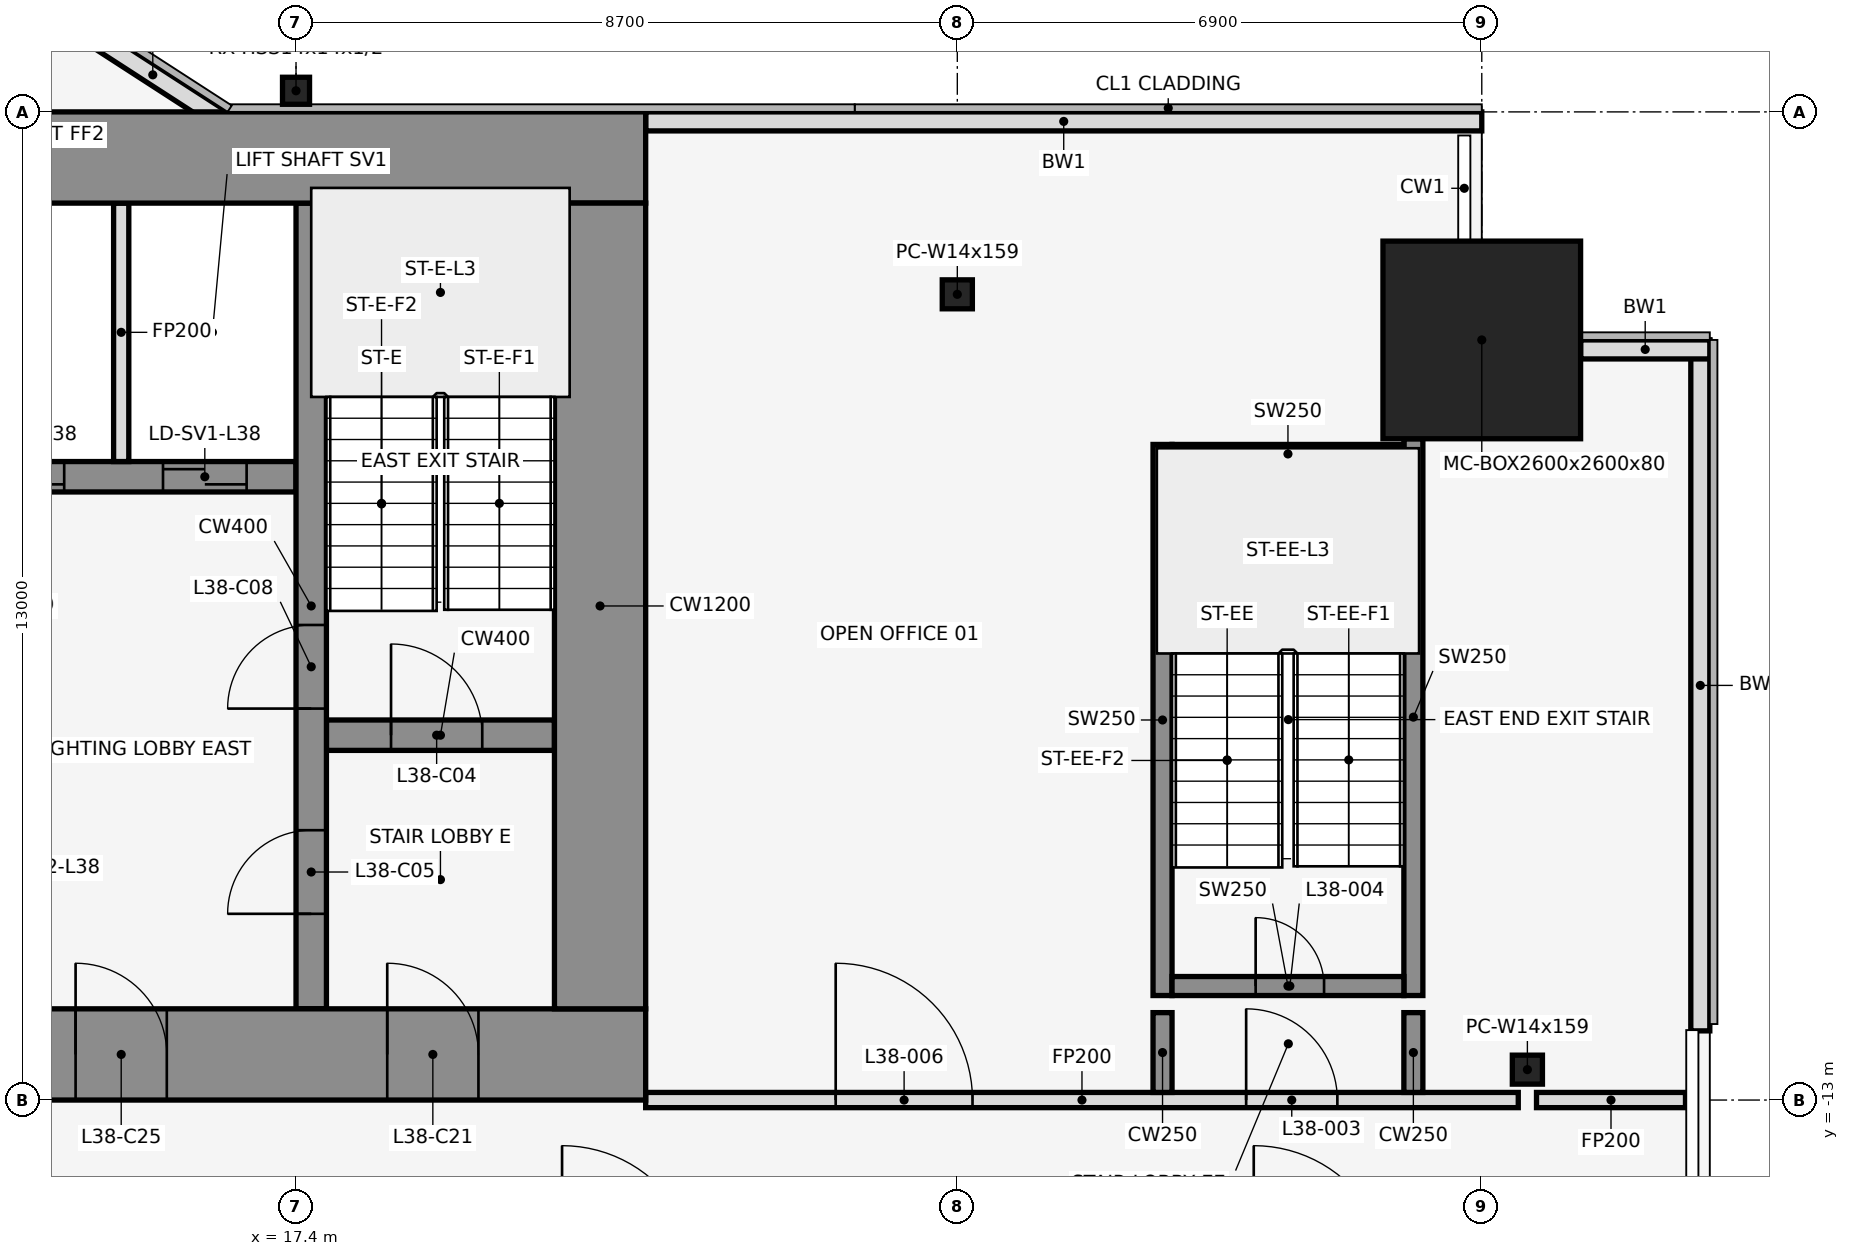
"""IFC4 building model, lengths in metres.
Left out: names, types, materials, properties, quantities, classifications, styles, units other than length and angle.
Written with IfcOpenShell. Run it as: python <this file> out.ifc"""

import sys

from ifc_helpers import new_model, si_unit, direction, frame, frame_2d, origin, origin_2d, place, context, subcontext, project, spatial, rectangle, hollow_rectangle, i_section, extrude, element, fill, save


model = new_model("IFC4")
c1 = context("Model", 3, precision=1e-05, world=origin(), true_north=direction((0.0, 1.0)))
c2 = subcontext(c1, "Body", "Model", "MODEL_VIEW")
j1 = project(units=[si_unit("LENGTHUNIT", "METRE"), si_unit("PLANEANGLEUNIT", "RADIAN")], contexts=[c1])
p1 = place(None, origin())
s1 = spatial("IfcSite", under=j1, at=p1, CompositionType="ELEMENT")
p2 = place(p1, origin())
s2 = spatial("IfcBuilding", under=s1, at=p2, CompositionType="ELEMENT")
p3 = place(p2, frame((0.0, 0.0, 173.2)))
s3 = spatial("IfcBuildingStorey", under=s2, at=p3, CompositionType="ELEMENT", Elevation=173.2)
p4 = place(p3, frame((26.1, -2.4, 0.0), z_axis=(0.0, 0.0, 1.0), x_axis=(1.0, 0.0, 0.0)))
e1 = element("IfcColumn", 1, at=p4, inside=s3, PredefinedType="COLUMN", context=c2, shape_type="SweptSolid", body=[
    extrude(i_section(OverallWidth=0.396, OverallDepth=0.381, WebThickness=0.019, FlangeThickness=0.03, at=origin_2d()), origin(), (0.0, 0.0, 1.0), 4.1),
])
p5 = place(p3, frame((33.0, -3.0, 0.0), z_axis=(0.0, 0.0, 1.0), x_axis=(1.0, 0.0, 0.0)))
e2 = element("IfcColumn", 2, at=p5, inside=s3, PredefinedType="COLUMN", context=c2, shape_type="SweptSolid", body=[
    extrude(hollow_rectangle(XDim=2.6, YDim=2.6, WallThickness=0.08, at=origin_2d()), origin(), (0.0, 0.0, 1.0), 4.1),
])
p6 = place(p3, frame((17.4, 0.278, 0.0), z_axis=(0.0, 0.0, 1.0), x_axis=(1.0, 0.0, 0.0)))
e3 = element("IfcColumn", 3, at=p6, inside=s3, PredefinedType="COLUMN", context=c2, shape_type="SweptSolid", body=[
    extrude(hollow_rectangle(XDim=0.356, YDim=0.356, WallThickness=0.012, at=origin_2d()), origin(), (0.0, 0.0, 1.0), 4.1),
])
p7 = place(p3, frame((33.6, -12.6, 0.0), z_axis=(0.0, 0.0, 1.0), x_axis=(1.0, 0.0, 0.0)))
e4 = element("IfcColumn", 4, at=p7, inside=s3, PredefinedType="COLUMN", context=c2, shape_type="SweptSolid", body=[
    extrude(i_section(OverallWidth=0.396, OverallDepth=0.381, WebThickness=0.019, FlangeThickness=0.03, at=origin_2d()), origin(), (0.0, 0.0, 1.0), 4.1),
])
p8 = place(p3, frame((33.0, -0.125, 0.0), z_axis=(0.0, 0.0, 1.0), x_axis=(-1.0, 0.0, 0.0)))
e5 = element("IfcWall", 5, at=p8, inside=s3, PredefinedType="STANDARD", context=c2, shape_type="SweptSolid", body=[
    extrude(rectangle(XDim=11.0, YDim=0.25, at=frame_2d((5.5, 0.0))), origin(), (0.0, 0.0, 1.0), 3.95),
])
p9 = place(p3, frame((16.432, -0.105, 0.0), z_axis=(0.0, 0.0, 1.0), x_axis=(-0.83981312244, 0.542875602121, 0.0)))
e6 = element("IfcWall", 6, at=p9, inside=s3, PredefinedType="STANDARD", context=c2, shape_type="SweptSolid", body=[
    extrude(rectangle(XDim=2.183, YDim=0.25, at=frame_2d((1.091, 0.0))), origin(), (0.0, 0.0, 1.0), 3.95),
])
p10 = place(p3, frame((35.875, -12.09, 0.0), z_axis=(0.0, 0.0, 1.0), x_axis=(0.0, 1.0, 0.0)))
e7 = element("IfcWall", 7, at=p10, inside=s3, PredefinedType="STANDARD", context=c2, shape_type="SweptSolid", body=[
    extrude(rectangle(XDim=9.09, YDim=0.25, at=frame_2d((4.545, 0.0))), origin(), (0.0, 0.0, 1.0), 3.95),
])
p11 = place(p3, frame((36.0, -3.125, 0.0), z_axis=(0.0, 0.0, 1.0), x_axis=(-1.0, 0.0, 0.0)))
e8 = element("IfcWall", 8, at=p11, inside=s3, PredefinedType="STANDARD", context=c2, shape_type="SweptSolid", body=[
    extrude(rectangle(XDim=1.7, YDim=0.25, at=frame_2d((0.85, 0.0))), origin(), (0.0, 0.0, 1.0), 3.95),
])
p12 = place(p3, frame((28.8, -11.625, 0.0), z_axis=(0.0, 0.0, 1.0), x_axis=(0.0, 1.0, 0.0)))
e9 = element("IfcWall", 9, at=p12, inside=s3, PredefinedType="SHEAR", context=c2, shape_type="SweptSolid", body=[
    extrude(rectangle(XDim=7.25, YDim=0.25, at=frame_2d((3.625, 0.0))), origin(), (0.0, 0.0, 1.0), 4.1),
])
p13 = place(p3, frame((32.1, -11.625, 0.0), z_axis=(0.0, 0.0, 1.0), x_axis=(0.0, 1.0, 0.0)))
e10 = element("IfcWall", 10, at=p13, inside=s3, PredefinedType="SHEAR", context=c2, shape_type="SweptSolid", body=[
    extrude(rectangle(XDim=7.325, YDim=0.25, at=frame_2d((3.663, 0.0))), origin(), (0.0, 0.0, 1.0), 4.1),
])
p14 = place(p3, frame((28.925, -11.5, 0.0), z_axis=(0.0, 0.0, 1.0), x_axis=(1.0, 0.0, 0.0)))
e11 = element("IfcWall", 11, at=p14, inside=s3, PredefinedType="SHEAR", context=c2, shape_type="SweptSolid", body=[
    extrude(rectangle(XDim=3.05, YDim=0.25, at=frame_2d((1.525, 0.0))), origin(), (0.0, 0.0, 1.0), 4.1),
])
p15 = place(p14, frame((1.1, 0.0, 0.0)))
e12 = element("IfcOpeningElement", 12, at=p15, cuts=e11, PredefinedType="OPENING", context=c2, shape_type="SweptSolid", body=[
    extrude(rectangle(XDim=0.9, YDim=2.1, at=frame_2d((0.45, 1.05))), frame((0.0, 0.137, 0.0), z_axis=(0.0, -1.0, 0.0), x_axis=(1.0, 0.0, 0.0)), (0.0, 0.0, 1.0), 0.274),
])
p16 = place(p3, frame((28.925, -4.5, 0.0), z_axis=(0.0, 0.0, 1.0), x_axis=(1.0, 0.0, 0.0)))
e13 = element("IfcWall", 13, at=p16, inside=s3, PredefinedType="SHEAR", context=c2, shape_type="SweptSolid", body=[
    extrude(rectangle(XDim=3.05, YDim=0.25, at=frame_2d((1.525, 0.0))), origin(), (0.0, 0.0, 1.0), 4.1),
])
p17 = place(p3, frame((22.0, -13.0, 0.0), z_axis=(0.0, 0.0, 1.0), x_axis=(1.0, 0.0, 0.0)))
e14 = element("IfcWall", 14, at=p17, inside=s3, PredefinedType="PARTITIONING", context=c2, shape_type="SweptSolid", body=[
    extrude(rectangle(XDim=11.48, YDim=0.2, at=frame_2d((5.74, 0.0))), origin(), (0.0, 0.0, 1.0), 2.84),
])
p18 = place(p17, frame((7.9, 0.0, 0.0)))
e15 = element("IfcOpeningElement", 15, at=p18, cuts=e14, PredefinedType="OPENING", context=c2, shape_type="SweptSolid", body=[
    extrude(rectangle(XDim=1.2, YDim=2.1, at=frame_2d((0.6, 1.05))), frame((0.0, 0.112, 0.0), z_axis=(0.0, -1.0, 0.0), x_axis=(1.0, 0.0, 0.0)), (0.0, 0.0, 1.0), 0.224),
])
p19 = place(p17, frame((2.5, 0.0, 0.0)))
e16 = element("IfcOpeningElement", 16, at=p19, cuts=e14, PredefinedType="OPENING", context=c2, shape_type="SweptSolid", body=[
    extrude(rectangle(XDim=1.8, YDim=2.1, at=frame_2d((0.9, 1.05))), frame((0.0, 0.112, 0.0), z_axis=(0.0, -1.0, 0.0), x_axis=(1.0, 0.0, 0.0)), (0.0, 0.0, 1.0), 0.224),
])
p20 = place(p3, frame((33.72, -13.0, 0.0), z_axis=(0.0, 0.0, 1.0), x_axis=(1.0, 0.0, 0.0)))
e17 = element("IfcWall", 17, at=p20, inside=s3, PredefinedType="PARTITIONING", context=c2, shape_type="SweptSolid", body=[
    extrude(rectangle(XDim=1.96, YDim=0.2, at=frame_2d((0.98, 0.0))), origin(), (0.0, 0.0, 1.0), 2.84),
])
for number, where, z_axis, x_axis in (
    (18, (28.8, -12.9, 0.0), (0.0, 0.0, 1.0), (0.0, 1.0, 0.0)),
    (19, (32.1, -12.9, 0.0), (0.0, 0.0, 1.0), (0.0, 1.0, 0.0)),
):
    element("IfcWall", number, at=place(p3, frame(where, z_axis=z_axis, x_axis=x_axis)), inside=s3, PredefinedType="SHEAR", context=c2, shape_type="SweptSolid", body=[
        extrude(rectangle(XDim=1.05, YDim=0.25, at=frame_2d((0.525, 0.0))), origin(), (0.0, 0.0, 1.0), 4.1),
    ])
p21 = place(p3, frame((17.8, -8.2, 0.0), z_axis=(0.0, 0.0, 1.0), x_axis=(1.0, 0.0, 0.0)))
e20 = element("IfcWall", 20, at=p21, inside=s3, PredefinedType="SHEAR", context=c2, shape_type="SweptSolid", body=[
    extrude(rectangle(XDim=3.0, YDim=0.4, at=frame_2d((1.5, 0.0))), origin(), (0.0, 0.0, 1.0), 4.1),
])
p22 = place(p21, frame((0.85, 0.0, 0.0)))
e21 = element("IfcOpeningElement", 21, at=p22, cuts=e20, PredefinedType="OPENING", context=c2, shape_type="SweptSolid", body=[
    extrude(rectangle(XDim=1.2, YDim=2.1, at=frame_2d((0.6, 1.05))), frame((0.0, 0.212, 0.0), z_axis=(0.0, -1.0, 0.0), x_axis=(1.0, 0.0, 0.0)), (0.0, 0.0, 1.0), 0.424),
])
p23 = place(p3, frame((3.8, -4.8, 0.0), z_axis=(0.0, 0.0, 1.0), x_axis=(1.0, 0.0, 0.0)))
e22 = element("IfcWall", 22, at=p23, inside=s3, PredefinedType="SHEAR", context=c2, shape_type="SweptSolid", body=[
    extrude(rectangle(XDim=13.6, YDim=0.4, at=frame_2d((6.8, 0.0))), origin(), (0.0, 0.0, 1.0), 4.1),
])
p24 = place(p23, frame((9.45, 0.0, 0.0)))
e23 = element("IfcOpeningElement", 23, at=p24, cuts=e22, PredefinedType="OPENING", context=c2, shape_type="SweptSolid", body=[
    extrude(rectangle(XDim=1.1, YDim=2.1, at=frame_2d((0.55, 1.05))), frame((0.0, 0.212, 0.0), z_axis=(0.0, -1.0, 0.0), x_axis=(1.0, 0.0, 0.0)), (0.0, 0.0, 1.0), 0.424),
])
p25 = place(p23, frame((11.85, 0.0, 0.0)))
e24 = element("IfcOpeningElement", 24, at=p25, cuts=e22, PredefinedType="OPENING", context=c2, shape_type="SweptSolid", body=[
    extrude(rectangle(XDim=1.1, YDim=2.1, at=frame_2d((0.55, 1.05))), frame((0.0, 0.212, 0.0), z_axis=(0.0, -1.0, 0.0), x_axis=(1.0, 0.0, 0.0)), (0.0, 0.0, 1.0), 0.424),
])
p26 = place(p23, frame((0.95, 0.0, 0.0)))
e25 = element("IfcOpeningElement", 25, at=p26, cuts=e22, PredefinedType="OPENING", context=c2, shape_type="SweptSolid", body=[
    extrude(rectangle(XDim=0.9, YDim=2.1, at=frame_2d((0.45, 1.05))), frame((0.0, 0.212, 0.0), z_axis=(0.0, -1.0, 0.0), x_axis=(1.0, 0.0, 0.0)), (0.0, 0.0, 1.0), 0.424),
])
p27 = place(p23, frame((5.35, 0.0, 0.0)))
e26 = element("IfcOpeningElement", 26, at=p27, cuts=e22, PredefinedType="OPENING", context=c2, shape_type="SweptSolid", body=[
    extrude(rectangle(XDim=0.9, YDim=2.1, at=frame_2d((0.45, 1.05))), frame((0.0, 0.212, 0.0), z_axis=(0.0, -1.0, 0.0), x_axis=(1.0, 0.0, 0.0)), (0.0, 0.0, 1.0), 0.424),
])
p28 = place(p3, frame((15.1, -4.6, 0.0), z_axis=(0.0, 0.0, 1.0), x_axis=(0.0, 1.0, 0.0)))
e27 = element("IfcWall", 27, at=p28, inside=s3, PredefinedType="PARTITIONING", context=c2, shape_type="SweptSolid", body=[
    extrude(rectangle(XDim=3.4, YDim=0.2, at=frame_2d((1.7, 0.0))), origin(), (0.0, 0.0, 1.0), 2.84),
])
p29 = place(p3, frame((17.6, -11.8, 0.0), z_axis=(0.0, 0.0, 1.0), x_axis=(0.0, 1.0, 0.0)))
e28 = element("IfcWall", 28, at=p29, inside=s3, PredefinedType="SHEAR", context=c2, shape_type="SweptSolid", body=[
    extrude(rectangle(XDim=10.6, YDim=0.4, at=frame_2d((5.3, 0.0))), origin(), (0.0, 0.0, 1.0), 4.1),
])
p30 = place(p29, frame((1.25, 0.0, 0.0)))
e29 = element("IfcOpeningElement", 29, at=p30, cuts=e28, PredefinedType="OPENING", context=c2, shape_type="SweptSolid", body=[
    extrude(rectangle(XDim=1.1, YDim=2.1, at=frame_2d((0.55, 1.05))), frame((0.0, 0.212, 0.0), z_axis=(0.0, -1.0, 0.0), x_axis=(1.0, 0.0, 0.0)), (0.0, 0.0, 1.0), 0.424),
])
p31 = place(p29, frame((3.95, 0.0, 0.0)))
e30 = element("IfcOpeningElement", 30, at=p31, cuts=e28, PredefinedType="OPENING", context=c2, shape_type="SweptSolid", body=[
    extrude(rectangle(XDim=1.1, YDim=2.1, at=frame_2d((0.55, 1.05))), frame((0.0, 0.212, 0.0), z_axis=(0.0, -1.0, 0.0), x_axis=(1.0, 0.0, 0.0)), (0.0, 0.0, 1.0), 0.424),
])
p32 = place(p3, frame((-22.0, -0.6, 0.0), z_axis=(0.0, 0.0, 1.0), x_axis=(1.0, 0.0, 0.0)))
e31 = element("IfcWall", 31, at=p32, inside=s3, PredefinedType="SHEAR", context=c2, shape_type="SweptSolid", body=[
    extrude(rectangle(XDim=44.0, YDim=1.2, at=frame_2d((22.0, 0.0))), origin(), (0.0, 0.0, 1.0), 4.1),
])
p33 = place(p32, frame((18.55, 0.0, 0.0)))
e32 = element("IfcOpeningElement", 32, at=p33, cuts=e31, PredefinedType="OPENING", context=c2, shape_type="SweptSolid", body=[
    extrude(rectangle(XDim=0.9, YDim=2.1, at=frame_2d((0.45, 1.05))), frame((0.0, 0.612, 0.0), z_axis=(0.0, -1.0, 0.0), x_axis=(1.0, 0.0, 0.0)), (0.0, 0.0, 1.0), 1.224),
])
p34 = place(p32, frame((24.55, 0.0, 0.0)))
e33 = element("IfcOpeningElement", 33, at=p34, cuts=e31, PredefinedType="OPENING", context=c2, shape_type="SweptSolid", body=[
    extrude(rectangle(XDim=0.9, YDim=2.1, at=frame_2d((0.45, 1.05))), frame((0.0, 0.612, 0.0), z_axis=(0.0, -1.0, 0.0), x_axis=(1.0, 0.0, 0.0)), (0.0, 0.0, 1.0), 1.224),
])
p35 = place(p3, frame((-22.0, -12.4, 0.0), z_axis=(0.0, 0.0, 1.0), x_axis=(1.0, 0.0, 0.0)))
e34 = element("IfcWall", 34, at=p35, inside=s3, PredefinedType="SHEAR", context=c2, shape_type="SweptSolid", body=[
    extrude(rectangle(XDim=44.0, YDim=1.2, at=frame_2d((22.0, 0.0))), origin(), (0.0, 0.0, 1.0), 4.1),
])
p36 = place(p35, frame((2.2, 0.0, 0.0)))
e35 = element("IfcOpeningElement", 35, at=p36, cuts=e34, PredefinedType="OPENING", context=c2, shape_type="SweptSolid", body=[
    extrude(rectangle(XDim=1.2, YDim=2.1, at=frame_2d((0.6, 1.05))), frame((0.0, 0.612, 0.0), z_axis=(0.0, -1.0, 0.0), x_axis=(1.0, 0.0, 0.0)), (0.0, 0.0, 1.0), 1.224),
])
p37 = place(p35, frame((21.4, 0.0, 0.0)))
e36 = element("IfcOpeningElement", 36, at=p37, cuts=e34, PredefinedType="OPENING", context=c2, shape_type="SweptSolid", body=[
    extrude(rectangle(XDim=1.2, YDim=2.1, at=frame_2d((0.6, 1.05))), frame((0.0, 0.612, 0.0), z_axis=(0.0, -1.0, 0.0), x_axis=(1.0, 0.0, 0.0)), (0.0, 0.0, 1.0), 1.224),
])
p38 = place(p35, frame((40.6, 0.0, 0.0)))
e37 = element("IfcOpeningElement", 37, at=p38, cuts=e34, PredefinedType="OPENING", context=c2, shape_type="SweptSolid", body=[
    extrude(rectangle(XDim=1.2, YDim=2.1, at=frame_2d((0.6, 1.05))), frame((0.0, 0.612, 0.0), z_axis=(0.0, -1.0, 0.0), x_axis=(1.0, 0.0, 0.0)), (0.0, 0.0, 1.0), 1.224),
])
p39 = place(p35, frame((16.0, 0.0, 0.0)))
e38 = element("IfcOpeningElement", 38, at=p39, cuts=e34, PredefinedType="OPENING", context=c2, shape_type="SweptSolid", body=[
    extrude(rectangle(XDim=1.8, YDim=2.1, at=frame_2d((0.9, 1.05))), frame((0.0, 0.612, 0.0), z_axis=(0.0, -1.0, 0.0), x_axis=(1.0, 0.0, 0.0)), (0.0, 0.0, 1.0), 1.224),
])
p40 = place(p35, frame((6.3, 0.0, 0.0)))
e39 = element("IfcOpeningElement", 39, at=p40, cuts=e34, PredefinedType="OPENING", context=c2, shape_type="SweptSolid", body=[
    extrude(rectangle(XDim=1.2, YDim=2.1, at=frame_2d((0.6, 1.05))), frame((0.0, 0.612, 0.0), z_axis=(0.0, -1.0, 0.0), x_axis=(1.0, 0.0, 0.0)), (0.0, 0.0, 1.0), 1.224),
])
p41 = place(p35, frame((26.2, 0.0, 0.0)))
e40 = element("IfcOpeningElement", 40, at=p41, cuts=e34, PredefinedType="OPENING", context=c2, shape_type="SweptSolid", body=[
    extrude(rectangle(XDim=1.8, YDim=2.1, at=frame_2d((0.9, 1.05))), frame((0.0, 0.612, 0.0), z_axis=(0.0, -1.0, 0.0), x_axis=(1.0, 0.0, 0.0)), (0.0, 0.0, 1.0), 1.224),
])
p42 = place(p35, frame((36.5, 0.0, 0.0)))
e41 = element("IfcOpeningElement", 41, at=p42, cuts=e34, PredefinedType="OPENING", context=c2, shape_type="SweptSolid", body=[
    extrude(rectangle(XDim=1.2, YDim=2.1, at=frame_2d((0.6, 1.05))), frame((0.0, 0.612, 0.0), z_axis=(0.0, -1.0, 0.0), x_axis=(1.0, 0.0, 0.0)), (0.0, 0.0, 1.0), 1.224),
])
p43 = place(p3, frame((21.4, -11.8, 0.0), z_axis=(0.0, 0.0, 1.0), x_axis=(0.0, 1.0, 0.0)))
e42 = element("IfcWall", 42, at=p43, inside=s3, PredefinedType="SHEAR", context=c2, shape_type="SweptSolid", body=[
    extrude(rectangle(XDim=10.6, YDim=1.2, at=frame_2d((5.3, 0.0))), origin(), (0.0, 0.0, 1.0), 4.1),
])
p44 = place(p18, origin())
e43 = element("IfcDoor", 43, at=p44, inside=s3, OperationType="SINGLE_SWING_RIGHT", PredefinedType="DOOR", context=c2, shape_type="SweptSolid", body=[
    extrude(rectangle(XDim=1.2, YDim=2.1, at=frame_2d((0.6, 1.05))), frame((0.0, 0.025, 0.0), z_axis=(0.0, -1.0, 0.0), x_axis=(1.0, 0.0, 0.0)), (0.0, 0.0, 1.0), 0.05),
])
fill(e15, e43)
p45 = place(p15, origin())
e44 = element("IfcDoor", 44, at=p45, inside=s3, OperationType="SINGLE_SWING_LEFT", PredefinedType="DOOR", context=c2, shape_type="SweptSolid", body=[
    extrude(rectangle(XDim=0.9, YDim=2.1, at=frame_2d((0.45, 1.05))), frame((0.0, 0.025, 0.0), z_axis=(0.0, -1.0, 0.0), x_axis=(1.0, 0.0, 0.0)), (0.0, 0.0, 1.0), 0.05),
])
fill(e12, e44)
p46 = place(p19, origin())
e45 = element("IfcDoor", 45, at=p46, inside=s3, OperationType="SINGLE_SWING_LEFT", PredefinedType="DOOR", context=c2, shape_type="SweptSolid", body=[
    extrude(rectangle(XDim=1.8, YDim=2.1, at=frame_2d((0.9, 1.05))), frame((0.0, 0.025, 0.0), z_axis=(0.0, -1.0, 0.0), x_axis=(1.0, 0.0, 0.0)), (0.0, 0.0, 1.0), 0.05),
])
fill(e16, e45)
p47 = place(p22, origin())
e46 = element("IfcDoor", 46, at=p47, inside=s3, OperationType="SINGLE_SWING_RIGHT", PredefinedType="DOOR", context=c2, shape_type="SweptSolid", body=[
    extrude(rectangle(XDim=1.2, YDim=2.1, at=frame_2d((0.6, 1.05))), frame((0.0, 0.025, 0.0), z_axis=(0.0, -1.0, 0.0), x_axis=(1.0, 0.0, 0.0)), (0.0, 0.0, 1.0), 0.05),
])
fill(e21, e46)
p48 = place(p30, origin())
e47 = element("IfcDoor", 47, at=p48, inside=s3, OperationType="SINGLE_SWING_LEFT", PredefinedType="DOOR", context=c2, shape_type="SweptSolid", body=[
    extrude(rectangle(XDim=1.1, YDim=2.1, at=frame_2d((0.55, 1.05))), frame((0.0, 0.025, 0.0), z_axis=(0.0, -1.0, 0.0), x_axis=(1.0, 0.0, 0.0)), (0.0, 0.0, 1.0), 0.05),
])
fill(e29, e47)
p49 = place(p24, origin())
e48 = element("IfcDoor", 48, at=p49, inside=s3, OperationType="DOUBLE_DOOR_SLIDING", PredefinedType="DOOR", context=c2, shape_type="SweptSolid", body=[
    extrude(rectangle(XDim=1.1, YDim=2.1, at=frame_2d((0.55, 1.05))), frame((0.0, 0.025, 0.0), z_axis=(0.0, -1.0, 0.0), x_axis=(1.0, 0.0, 0.0)), (0.0, 0.0, 1.0), 0.05),
])
fill(e23, e48)
p50 = place(p25, origin())
e49 = element("IfcDoor", 49, at=p50, inside=s3, OperationType="DOUBLE_DOOR_SLIDING", PredefinedType="DOOR", context=c2, shape_type="SweptSolid", body=[
    extrude(rectangle(XDim=1.1, YDim=2.1, at=frame_2d((0.55, 1.05))), frame((0.0, 0.025, 0.0), z_axis=(0.0, -1.0, 0.0), x_axis=(1.0, 0.0, 0.0)), (0.0, 0.0, 1.0), 0.05),
])
fill(e24, e49)
p51 = place(p31, origin())
e50 = element("IfcDoor", 50, at=p51, inside=s3, OperationType="SINGLE_SWING_RIGHT", PredefinedType="DOOR", context=c2, shape_type="SweptSolid", body=[
    extrude(rectangle(XDim=1.1, YDim=2.1, at=frame_2d((0.55, 1.05))), frame((0.0, 0.025, 0.0), z_axis=(0.0, -1.0, 0.0), x_axis=(1.0, 0.0, 0.0)), (0.0, 0.0, 1.0), 0.05),
])
fill(e30, e50)
p52 = place(p38, frame((1.2, 0.0, 0.0), z_axis=(0.0, 0.0, 1.0), x_axis=(-1.0, 0.0, 0.0)))
e51 = element("IfcDoor", 51, at=p52, inside=s3, OperationType="SINGLE_SWING_RIGHT", PredefinedType="DOOR", context=c2, shape_type="SweptSolid", body=[
    extrude(rectangle(XDim=1.2, YDim=2.1, at=frame_2d((0.6, 1.05))), frame((0.0, 0.025, 0.0), z_axis=(0.0, -1.0, 0.0), x_axis=(1.0, 0.0, 0.0)), (0.0, 0.0, 1.0), 0.05),
])
fill(e37, e51)
p53 = place(p42, frame((1.2, 0.0, 0.0), z_axis=(0.0, 0.0, 1.0), x_axis=(-1.0, 0.0, 0.0)))
e52 = element("IfcDoor", 52, at=p53, inside=s3, OperationType="SINGLE_SWING_RIGHT", PredefinedType="DOOR", context=c2, shape_type="SweptSolid", body=[
    extrude(rectangle(XDim=1.2, YDim=2.1, at=frame_2d((0.6, 1.05))), frame((0.0, 0.025, 0.0), z_axis=(0.0, -1.0, 0.0), x_axis=(1.0, 0.0, 0.0)), (0.0, 0.0, 1.0), 0.05),
])
fill(e41, e52)
save(model, sys.argv[1])
